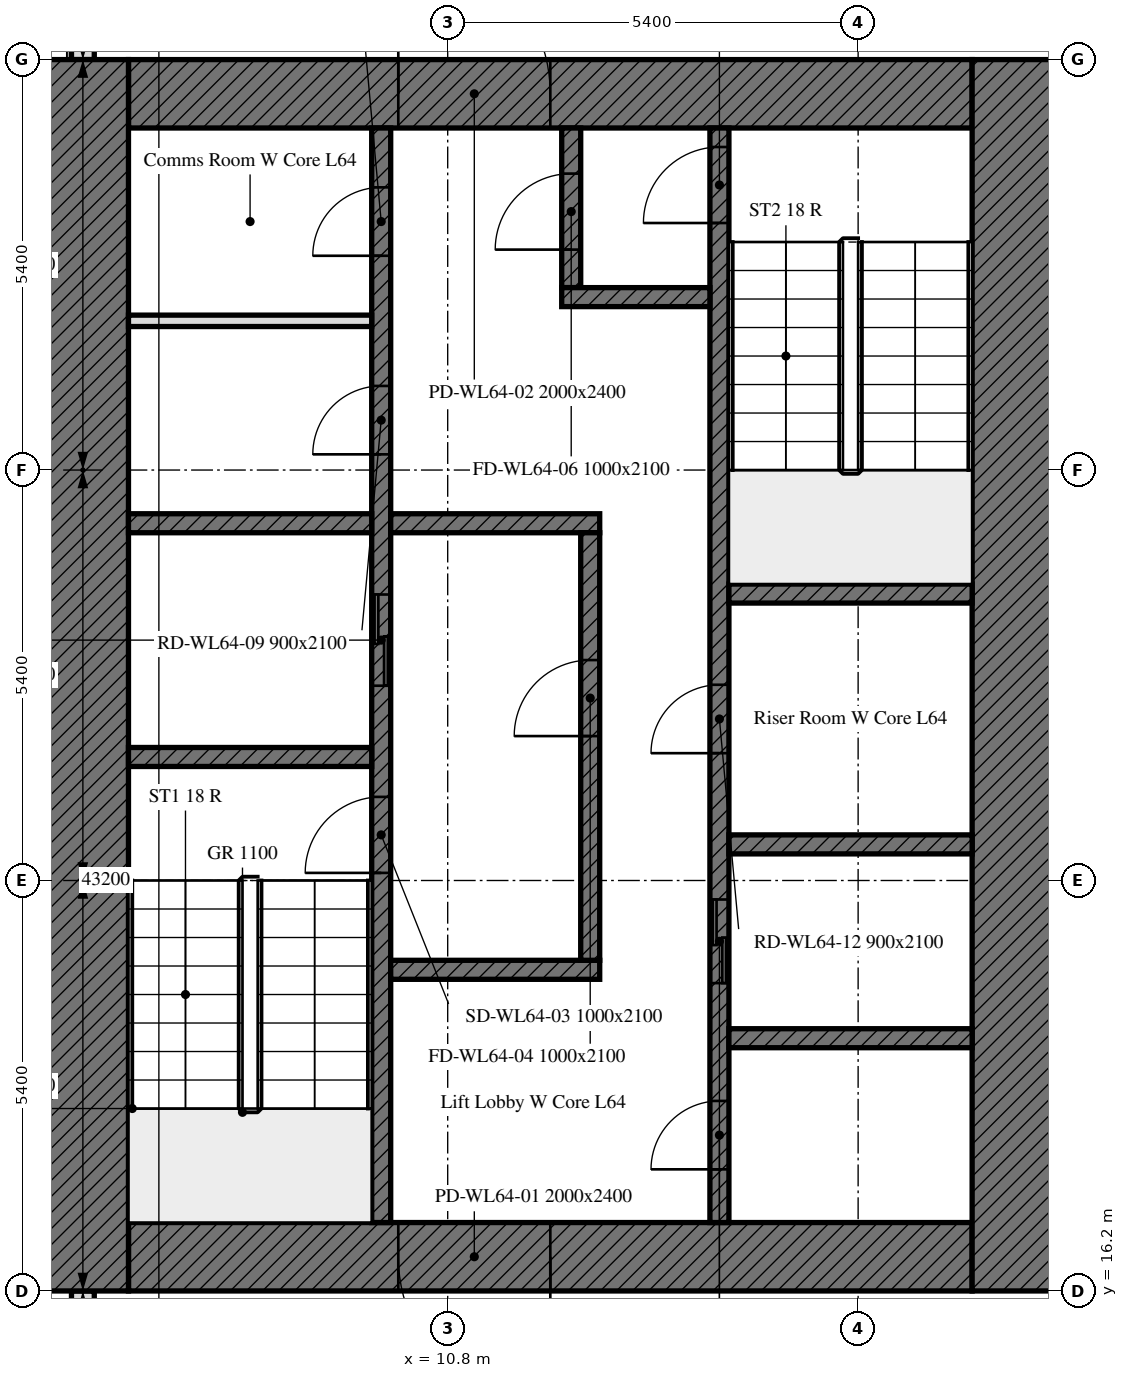
"""IFC4 building model, lengths in metres.
Left out: names, types, materials, properties, quantities, classifications, styles, units other than length and angle.
Written with IfcOpenShell. Run it as: python <this file> out.ifc"""

import sys

from ifc_helpers import new_model, si_unit, direction, frame, frame_2d, origin, place, context, subcontext, project, spatial, rectangle, extrude, element, fill, save


model = new_model("IFC4")
c1 = context("Model", 3, precision=1e-05, world=origin(), true_north=direction((0.0, 1.0)))
c2 = subcontext(c1, "Body", "Model", "MODEL_VIEW")
j1 = project(units=[si_unit("LENGTHUNIT", "METRE"), si_unit("PLANEANGLEUNIT", "RADIAN")], contexts=[c1])
p1 = place(None, origin())
s1 = spatial("IfcSite", under=j1, at=p1, CompositionType="ELEMENT")
p2 = place(p1, origin())
s2 = spatial("IfcBuilding", under=s1, at=p2, CompositionType="ELEMENT")
p3 = place(p2, frame((0.0, 0.0, 265.3)))
s3 = spatial("IfcBuildingStorey", under=s2, at=p3, CompositionType="ELEMENT", Elevation=265.3)
p4 = place(p3, frame((6.0, 37.614, 0.0), z_axis=(0.0, 0.0, 1.0), x_axis=(0.0, -1.0, 0.0)))
e1 = element("IfcWall", 1, at=p4, inside=s3, PredefinedType="SOLIDWALL", context=c2, shape_type="SweptSolid", body=[
    extrude(rectangle(XDim=5.214, YDim=0.3, at=frame_2d((2.607, 0.0))), origin(), (0.0, 0.0, 1.0), 3.0),
])
p5 = place(p4, frame((1.164, 0.0, 0.9)))
e2 = element("IfcOpeningElement", 2, at=p5, cuts=e1, PredefinedType="OPENING", context=c2, shape_type="SweptSolid", body=[
    extrude(rectangle(XDim=1.1, YDim=1.7, at=frame_2d((0.55, 0.85))), frame((0.0, 0.16, 0.0), z_axis=(0.0, -1.0, 0.0), x_axis=(1.0, 0.0, 0.0)), (0.0, 0.0, 1.0), 0.32),
])
p6 = place(p4, frame((3.139, 0.0, 0.9)))
e3 = element("IfcOpeningElement", 3, at=p6, cuts=e1, PredefinedType="OPENING", context=c2, shape_type="SweptSolid", body=[
    extrude(rectangle(XDim=0.65, YDim=1.7, at=frame_2d((0.325, 0.85))), frame((0.0, 0.16, 0.0), z_axis=(0.0, -1.0, 0.0), x_axis=(1.0, 0.0, 0.0)), (0.0, 0.0, 1.0), 0.32),
])
p7 = place(p3, frame((6.0, 16.2, 0.0), z_axis=(0.0, 0.0, 1.0), x_axis=(0.0, -1.0, 0.0)))
e4 = element("IfcWall", 4, at=p7, inside=s3, PredefinedType="SOLIDWALL", context=c2, shape_type="SweptSolid", body=[
    extrude(rectangle(XDim=10.614, YDim=0.3, at=frame_2d((5.307, 0.0))), origin(), (0.0, 0.0, 1.0), 3.0),
])
p8 = place(p7, frame((1.0, 0.0, 0.9)))
e5 = element("IfcOpeningElement", 5, at=p8, cuts=e4, PredefinedType="OPENING", context=c2, shape_type="SweptSolid", body=[
    extrude(rectangle(XDim=1.1, YDim=1.7, at=frame_2d((0.55, 0.85))), frame((0.0, 0.16, 0.0), z_axis=(0.0, -1.0, 0.0), x_axis=(1.0, 0.0, 0.0)), (0.0, 0.0, 1.0), 0.32),
])
p9 = place(p7, frame((2.95, 0.0, 0.9)))
e6 = element("IfcOpeningElement", 6, at=p9, cuts=e4, PredefinedType="OPENING", context=c2, shape_type="SweptSolid", body=[
    extrude(rectangle(XDim=1.1, YDim=1.7, at=frame_2d((0.55, 0.85))), frame((0.0, 0.16, 0.0), z_axis=(0.0, -1.0, 0.0), x_axis=(1.0, 0.0, 0.0)), (0.0, 0.0, 1.0), 0.32),
])
p10 = place(p7, frame((6.75, 0.0, 0.9)))
e7 = element("IfcOpeningElement", 7, at=p10, cuts=e4, PredefinedType="OPENING", context=c2, shape_type="SweptSolid", body=[
    extrude(rectangle(XDim=1.1, YDim=1.7, at=frame_2d((0.55, 0.85))), frame((0.0, 0.16, 0.0), z_axis=(0.0, -1.0, 0.0), x_axis=(1.0, 0.0, 0.0)), (0.0, 0.0, 1.0), 0.32),
])
p11 = place(p7, frame((8.2, 0.0, 0.9)))
e8 = element("IfcOpeningElement", 8, at=p11, cuts=e4, PredefinedType="OPENING", context=c2, shape_type="SweptSolid", body=[
    extrude(rectangle(XDim=1.1, YDim=1.7, at=frame_2d((0.55, 0.85))), frame((0.0, 0.16, 0.0), z_axis=(0.0, -1.0, 0.0), x_axis=(1.0, 0.0, 0.0)), (0.0, 0.0, 1.0), 0.32),
])
p12 = place(p3, frame((17.7, 16.65, 0.0), z_axis=(0.0, 0.0, 1.0), x_axis=(-1.0, 0.0, 0.0)))
e9 = element("IfcWall", 9, at=p12, inside=s3, PredefinedType="SOLIDWALL", context=c2, shape_type="SweptSolid", body=[
    extrude(rectangle(XDim=11.1, YDim=0.9, at=frame_2d((5.55, 0.0))), origin(), (0.0, 0.0, 1.0), 3.0),
])
p13 = place(p12, frame((5.55, 0.0, 0.0)))
e10 = element("IfcOpeningElement", 10, at=p13, cuts=e9, PredefinedType="OPENING", context=c2, shape_type="SweptSolid", body=[
    extrude(rectangle(XDim=2.0, YDim=2.4, at=frame_2d((1.0, 1.2))), frame((0.0, 0.45, 0.0), z_axis=(0.0, -1.0, 0.0), x_axis=(1.0, 0.0, 0.0)), (0.0, 0.0, 1.0), 0.9),
])
p14 = place(p3, frame((6.6, 31.95, 0.0), z_axis=(0.0, 0.0, 1.0), x_axis=(1.0, 0.0, 0.0)))
e11 = element("IfcWall", 11, at=p14, inside=s3, PredefinedType="SOLIDWALL", context=c2, shape_type="SweptSolid", body=[
    extrude(rectangle(XDim=11.1, YDim=0.9, at=frame_2d((5.55, 0.0))), origin(), (0.0, 0.0, 1.0), 3.0),
])
p15 = place(p14, frame((3.55, 0.0, 0.0)))
e12 = element("IfcOpeningElement", 12, at=p15, cuts=e11, PredefinedType="OPENING", context=c2, shape_type="SweptSolid", body=[
    extrude(rectangle(XDim=2.0, YDim=2.4, at=frame_2d((1.0, 1.2))), frame((0.0, 0.45, 0.0), z_axis=(0.0, -1.0, 0.0), x_axis=(1.0, 0.0, 0.0)), (0.0, 0.0, 1.0), 0.9),
])
for number, where, z_axis, x_axis in (
    (13, (6.0, 16.2, 0.0), (0.0, 0.0, 1.0), (0.0, 1.0, 0.0)),
    (14, (18.3, 32.4, 0.0), (0.0, 0.0, 1.0), (0.0, -1.0, 0.0)),
):
    element("IfcWall", number, at=place(p3, frame(where, z_axis=z_axis, x_axis=x_axis)), inside=s3, PredefinedType="SOLIDWALL", context=c2, shape_type="SweptSolid", body=[
        extrude(rectangle(XDim=16.2, YDim=1.2, at=frame_2d((8.1, 0.0))), origin(), (0.0, 0.0, 1.0), 3.0),
    ])
p16 = place(p3, frame((9.925, 17.1, 0.0), z_axis=(0.0, 0.0, 1.0), x_axis=(0.0, 1.0, 0.0)))
e15 = element("IfcWall", 15, at=p16, inside=s3, PredefinedType="SOLIDWALL", context=c2, shape_type="SweptSolid", body=[
    extrude(rectangle(XDim=14.4, YDim=0.25, at=frame_2d((7.2, 0.0))), origin(), (0.0, 0.0, 1.0), 3.0),
])
p17 = place(p16, frame((4.6, 0.0, 0.0)))
e16 = element("IfcOpeningElement", 16, at=p17, cuts=e15, PredefinedType="OPENING", context=c2, shape_type="SweptSolid", body=[
    extrude(rectangle(XDim=1.0, YDim=2.1, at=frame_2d((0.5, 1.05))), frame((0.0, 0.125, 0.0), z_axis=(0.0, -1.0, 0.0), x_axis=(1.0, 0.0, 0.0)), (0.0, 0.0, 1.0), 0.25),
])
p18 = place(p16, frame((7.062, 0.0, 0.0)))
e17 = element("IfcOpeningElement", 17, at=p18, cuts=e15, PredefinedType="OPENING", context=c2, shape_type="SweptSolid", body=[
    extrude(rectangle(XDim=1.2, YDim=2.1, at=frame_2d((0.6, 1.05))), frame((0.0, 0.125, 0.0), z_axis=(0.0, -1.0, 0.0), x_axis=(1.0, 0.0, 0.0)), (0.0, 0.0, 1.0), 0.25),
])
p19 = place(p16, frame((10.106, 0.0, 0.0)))
e18 = element("IfcOpeningElement", 18, at=p19, cuts=e15, PredefinedType="OPENING", context=c2, shape_type="SweptSolid", body=[
    extrude(rectangle(XDim=0.9, YDim=2.1, at=frame_2d((0.45, 1.05))), frame((0.0, 0.125, 0.0), z_axis=(0.0, -1.0, 0.0), x_axis=(1.0, 0.0, 0.0)), (0.0, 0.0, 1.0), 0.25),
])
p20 = place(p16, frame((12.719, 0.0, 0.0)))
e19 = element("IfcOpeningElement", 19, at=p20, cuts=e15, PredefinedType="OPENING", context=c2, shape_type="SweptSolid", body=[
    extrude(rectangle(XDim=0.9, YDim=2.1, at=frame_2d((0.45, 1.05))), frame((0.0, 0.125, 0.0), z_axis=(0.0, -1.0, 0.0), x_axis=(1.0, 0.0, 0.0)), (0.0, 0.0, 1.0), 0.25),
])
p21 = place(p3, frame((14.375, 17.1, 0.0), z_axis=(0.0, 0.0, 1.0), x_axis=(0.0, 1.0, 0.0)))
e20 = element("IfcWall", 20, at=p21, inside=s3, PredefinedType="SOLIDWALL", context=c2, shape_type="SweptSolid", body=[
    extrude(rectangle(XDim=14.4, YDim=0.25, at=frame_2d((7.2, 0.0))), origin(), (0.0, 0.0, 1.0), 3.0),
])
p22 = place(p21, frame((13.15, 0.0, 0.0)))
e21 = element("IfcOpeningElement", 21, at=p22, cuts=e20, PredefinedType="OPENING", context=c2, shape_type="SweptSolid", body=[
    extrude(rectangle(XDim=1.0, YDim=2.1, at=frame_2d((0.5, 1.05))), frame((0.0, 0.125, 0.0), z_axis=(0.0, -1.0, 0.0), x_axis=(1.0, 0.0, 0.0)), (0.0, 0.0, 1.0), 0.25),
])
p23 = place(p21, frame((3.15, 0.0, 0.0)))
e22 = element("IfcOpeningElement", 22, at=p23, cuts=e20, PredefinedType="OPENING", context=c2, shape_type="SweptSolid", body=[
    extrude(rectangle(XDim=1.1, YDim=2.1, at=frame_2d((0.55, 1.05))), frame((0.0, 0.125, 0.0), z_axis=(0.0, -1.0, 0.0), x_axis=(1.0, 0.0, 0.0)), (0.0, 0.0, 1.0), 0.25),
])
p24 = place(p21, frame((0.7, 0.0, 0.0)))
e23 = element("IfcOpeningElement", 23, at=p24, cuts=e20, PredefinedType="OPENING", context=c2, shape_type="SweptSolid", body=[
    extrude(rectangle(XDim=0.9, YDim=2.1, at=frame_2d((0.45, 1.05))), frame((0.0, 0.125, 0.0), z_axis=(0.0, -1.0, 0.0), x_axis=(1.0, 0.0, 0.0)), (0.0, 0.0, 1.0), 0.25),
])
p25 = place(p21, frame((6.175, 0.0, 0.0)))
e24 = element("IfcOpeningElement", 24, at=p25, cuts=e20, PredefinedType="OPENING", context=c2, shape_type="SweptSolid", body=[
    extrude(rectangle(XDim=0.9, YDim=2.1, at=frame_2d((0.45, 1.05))), frame((0.0, 0.125, 0.0), z_axis=(0.0, -1.0, 0.0), x_axis=(1.0, 0.0, 0.0)), (0.0, 0.0, 1.0), 0.25),
])
for number, where, z_axis, x_axis in (
    (25, (6.6, 23.225, 0.0), (0.0, 0.0, 1.0), (1.0, 0.0, 0.0)),
    (26, (14.5, 25.375, 0.0), (0.0, 0.0, 1.0), (1.0, 0.0, 0.0)),
    (27, (14.5, 22.075, 0.0), (0.0, 0.0, 1.0), (1.0, 0.0, 0.0)),
    (28, (6.6, 26.3, 0.0), (0.0, 0.0, 1.0), (1.0, 0.0, 0.0)),
):
    element("IfcWall", number, at=place(p3, frame(where, z_axis=z_axis, x_axis=x_axis)), inside=s3, PredefinedType="SOLIDWALL", context=c2, shape_type="SweptSolid", body=[
        extrude(rectangle(XDim=3.2, YDim=0.25, at=frame_2d((1.6, 0.0))), origin(), (0.0, 0.0, 1.0), 3.0),
    ])
for number, where, z_axis, x_axis in (
    (29, (10.05, 26.3, 0.0), (0.0, 0.0, 1.0), (1.0, 0.0, 0.0)),
    (30, (10.05, 20.425, 0.0), (0.0, 0.0, 1.0), (1.0, 0.0, 0.0)),
):
    element("IfcWall", number, at=place(p3, frame(where, z_axis=z_axis, x_axis=x_axis)), inside=s3, PredefinedType="SOLIDWALL", context=c2, shape_type="SweptSolid", body=[
        extrude(rectangle(XDim=2.75, YDim=0.25, at=frame_2d((1.375, 0.0))), origin(), (0.0, 0.0, 1.0), 3.0),
    ])
p26 = place(p3, frame((12.425, 29.4, 0.0), z_axis=(0.0, 0.0, 1.0), x_axis=(0.0, 1.0, 0.0)))
e31 = element("IfcWall", 31, at=p26, inside=s3, PredefinedType="SOLIDWALL", context=c2, shape_type="SweptSolid", body=[
    extrude(rectangle(XDim=2.1, YDim=0.25, at=frame_2d((1.05, 0.0))), origin(), (0.0, 0.0, 1.0), 3.0),
])
p27 = place(p26, frame((0.5, 0.0, 0.0)))
e32 = element("IfcOpeningElement", 32, at=p27, cuts=e31, PredefinedType="OPENING", context=c2, shape_type="SweptSolid", body=[
    extrude(rectangle(XDim=1.0, YDim=2.1, at=frame_2d((0.5, 1.05))), frame((0.0, 0.125, 0.0), z_axis=(0.0, -1.0, 0.0), x_axis=(1.0, 0.0, 0.0)), (0.0, 0.0, 1.0), 0.25),
])
p28 = place(p3, frame((12.3, 29.275, 0.0), z_axis=(0.0, 0.0, 1.0), x_axis=(1.0, 0.0, 0.0)))
e33 = element("IfcWall", 33, at=p28, inside=s3, PredefinedType="SOLIDWALL", context=c2, shape_type="SweptSolid", body=[
    extrude(rectangle(XDim=1.95, YDim=0.25, at=frame_2d((0.975, 0.0))), origin(), (0.0, 0.0, 1.0), 3.0),
])
p29 = place(p3, frame((12.675, 20.55, 0.0), z_axis=(0.0, 0.0, 1.0), x_axis=(0.0, 1.0, 0.0)))
e34 = element("IfcWall", 34, at=p29, inside=s3, PredefinedType="SOLIDWALL", context=c2, shape_type="SweptSolid", body=[
    extrude(rectangle(XDim=5.625, YDim=0.25, at=frame_2d((2.812, 0.0))), origin(), (0.0, 0.0, 1.0), 3.0),
])
p30 = place(p29, frame((2.95, 0.0, 0.0)))
e35 = element("IfcOpeningElement", 35, at=p30, cuts=e34, PredefinedType="OPENING", context=c2, shape_type="SweptSolid", body=[
    extrude(rectangle(XDim=1.0, YDim=2.1, at=frame_2d((0.5, 1.05))), frame((0.0, 0.125, 0.0), z_axis=(0.0, -1.0, 0.0), x_axis=(1.0, 0.0, 0.0)), (0.0, 0.0, 1.0), 0.25),
])
p31 = place(p3, frame((14.5, 19.525, 0.0), z_axis=(0.0, 0.0, 1.0), x_axis=(1.0, 0.0, 0.0)))
e36 = element("IfcWall", 36, at=p31, inside=s3, PredefinedType="SOLIDWALL", context=c2, shape_type="SweptSolid", body=[
    extrude(rectangle(XDim=3.2, YDim=0.25, at=frame_2d((1.6, 0.0))), origin(), (0.0, 0.0, 1.0), 3.0),
])
p32 = place(p3, frame((6.6, 28.963, 0.0), z_axis=(0.0, 0.0, 1.0), x_axis=(1.0, 0.0, 0.0)))
e37 = element("IfcWall", 37, at=p32, inside=s3, PredefinedType="PARTITIONING", context=c2, shape_type="SweptSolid", body=[
    extrude(rectangle(XDim=3.2, YDim=0.15, at=frame_2d((1.6, 0.0))), origin(), (0.0, 0.0, 1.0), 3.0),
])
p33 = place(p13, origin())
e38 = element("IfcDoor", 38, at=p33, inside=s3, OperationType="DOUBLE_DOOR_SINGLE_SWING", PredefinedType="DOOR", context=c2, shape_type="SweptSolid", body=[
    extrude(rectangle(XDim=2.0, YDim=2.4, at=frame_2d((1.0, 1.2))), frame((0.0, 0.025, 0.0), z_axis=(0.0, -1.0, 0.0), x_axis=(1.0, 0.0, 0.0)), (0.0, 0.0, 1.0), 0.05),
])
fill(e10, e38)
p34 = place(p15, origin())
e39 = element("IfcDoor", 39, at=p34, inside=s3, OperationType="DOUBLE_DOOR_SINGLE_SWING", PredefinedType="DOOR", context=c2, shape_type="SweptSolid", body=[
    extrude(rectangle(XDim=2.0, YDim=2.4, at=frame_2d((1.0, 1.2))), frame((0.0, 0.025, 0.0), z_axis=(0.0, -1.0, 0.0), x_axis=(1.0, 0.0, 0.0)), (0.0, 0.0, 1.0), 0.05),
])
fill(e12, e39)
p35 = place(p17, origin())
e40 = element("IfcDoor", 40, at=p35, inside=s3, OperationType="SINGLE_SWING_LEFT", PredefinedType="DOOR", context=c2, shape_type="SweptSolid", body=[
    extrude(rectangle(XDim=1.0, YDim=2.1, at=frame_2d((0.5, 1.05))), frame((0.0, 0.025, 0.0), z_axis=(0.0, -1.0, 0.0), x_axis=(1.0, 0.0, 0.0)), (0.0, 0.0, 1.0), 0.05),
])
fill(e16, e40)
p36 = place(p30, origin())
e41 = element("IfcDoor", 41, at=p36, inside=s3, OperationType="SINGLE_SWING_LEFT", PredefinedType="DOOR", context=c2, shape_type="SweptSolid", body=[
    extrude(rectangle(XDim=1.0, YDim=2.1, at=frame_2d((0.5, 1.05))), frame((0.0, 0.025, 0.0), z_axis=(0.0, -1.0, 0.0), x_axis=(1.0, 0.0, 0.0)), (0.0, 0.0, 1.0), 0.05),
])
fill(e35, e41)
p37 = place(p22, origin())
e42 = element("IfcDoor", 42, at=p37, inside=s3, OperationType="SINGLE_SWING_LEFT", PredefinedType="DOOR", context=c2, shape_type="SweptSolid", body=[
    extrude(rectangle(XDim=1.0, YDim=2.1, at=frame_2d((0.5, 1.05))), frame((0.0, 0.025, 0.0), z_axis=(0.0, -1.0, 0.0), x_axis=(1.0, 0.0, 0.0)), (0.0, 0.0, 1.0), 0.05),
])
fill(e21, e42)
p38 = place(p27, origin())
e43 = element("IfcDoor", 43, at=p38, inside=s3, OperationType="SINGLE_SWING_LEFT", PredefinedType="DOOR", context=c2, shape_type="SweptSolid", body=[
    extrude(rectangle(XDim=1.0, YDim=2.1, at=frame_2d((0.5, 1.05))), frame((0.0, 0.025, 0.0), z_axis=(0.0, -1.0, 0.0), x_axis=(1.0, 0.0, 0.0)), (0.0, 0.0, 1.0), 0.05),
])
fill(e32, e43)
p39 = place(p18, origin())
e44 = element("IfcDoor", 44, at=p39, inside=s3, OperationType="DOUBLE_DOOR_SLIDING", PredefinedType="DOOR", context=c2, shape_type="SweptSolid", body=[
    extrude(rectangle(XDim=1.2, YDim=2.1, at=frame_2d((0.6, 1.05))), frame((0.0, 0.025, 0.0), z_axis=(0.0, -1.0, 0.0), x_axis=(1.0, 0.0, 0.0)), (0.0, 0.0, 1.0), 0.05),
])
fill(e17, e44)
p40 = place(p23, origin())
e45 = element("IfcDoor", 45, at=p40, inside=s3, OperationType="DOUBLE_DOOR_SLIDING", PredefinedType="DOOR", context=c2, shape_type="SweptSolid", body=[
    extrude(rectangle(XDim=1.1, YDim=2.1, at=frame_2d((0.55, 1.05))), frame((0.0, 0.025, 0.0), z_axis=(0.0, -1.0, 0.0), x_axis=(1.0, 0.0, 0.0)), (0.0, 0.0, 1.0), 0.05),
])
fill(e22, e45)
p41 = place(p19, origin())
e46 = element("IfcDoor", 46, at=p41, inside=s3, OperationType="SINGLE_SWING_LEFT", PredefinedType="DOOR", context=c2, shape_type="SweptSolid", body=[
    extrude(rectangle(XDim=0.9, YDim=2.1, at=frame_2d((0.45, 1.05))), frame((0.0, 0.025, 0.0), z_axis=(0.0, -1.0, 0.0), x_axis=(1.0, 0.0, 0.0)), (0.0, 0.0, 1.0), 0.05),
])
fill(e18, e46)
p42 = place(p20, origin())
e47 = element("IfcDoor", 47, at=p42, inside=s3, OperationType="SINGLE_SWING_LEFT", PredefinedType="DOOR", context=c2, shape_type="SweptSolid", body=[
    extrude(rectangle(XDim=0.9, YDim=2.1, at=frame_2d((0.45, 1.05))), frame((0.0, 0.025, 0.0), z_axis=(0.0, -1.0, 0.0), x_axis=(1.0, 0.0, 0.0)), (0.0, 0.0, 1.0), 0.05),
])
fill(e19, e47)
p43 = place(p24, origin())
e48 = element("IfcDoor", 48, at=p43, inside=s3, OperationType="SINGLE_SWING_LEFT", PredefinedType="DOOR", context=c2, shape_type="SweptSolid", body=[
    extrude(rectangle(XDim=0.9, YDim=2.1, at=frame_2d((0.45, 1.05))), frame((0.0, 0.025, 0.0), z_axis=(0.0, -1.0, 0.0), x_axis=(1.0, 0.0, 0.0)), (0.0, 0.0, 1.0), 0.05),
])
fill(e23, e48)
p44 = place(p25, origin())
e49 = element("IfcDoor", 49, at=p44, inside=s3, OperationType="SINGLE_SWING_LEFT", PredefinedType="DOOR", context=c2, shape_type="SweptSolid", body=[
    extrude(rectangle(XDim=0.9, YDim=2.1, at=frame_2d((0.45, 1.05))), frame((0.0, 0.025, 0.0), z_axis=(0.0, -1.0, 0.0), x_axis=(1.0, 0.0, 0.0)), (0.0, 0.0, 1.0), 0.05),
])
fill(e24, e49)
save(model, sys.argv[1])
